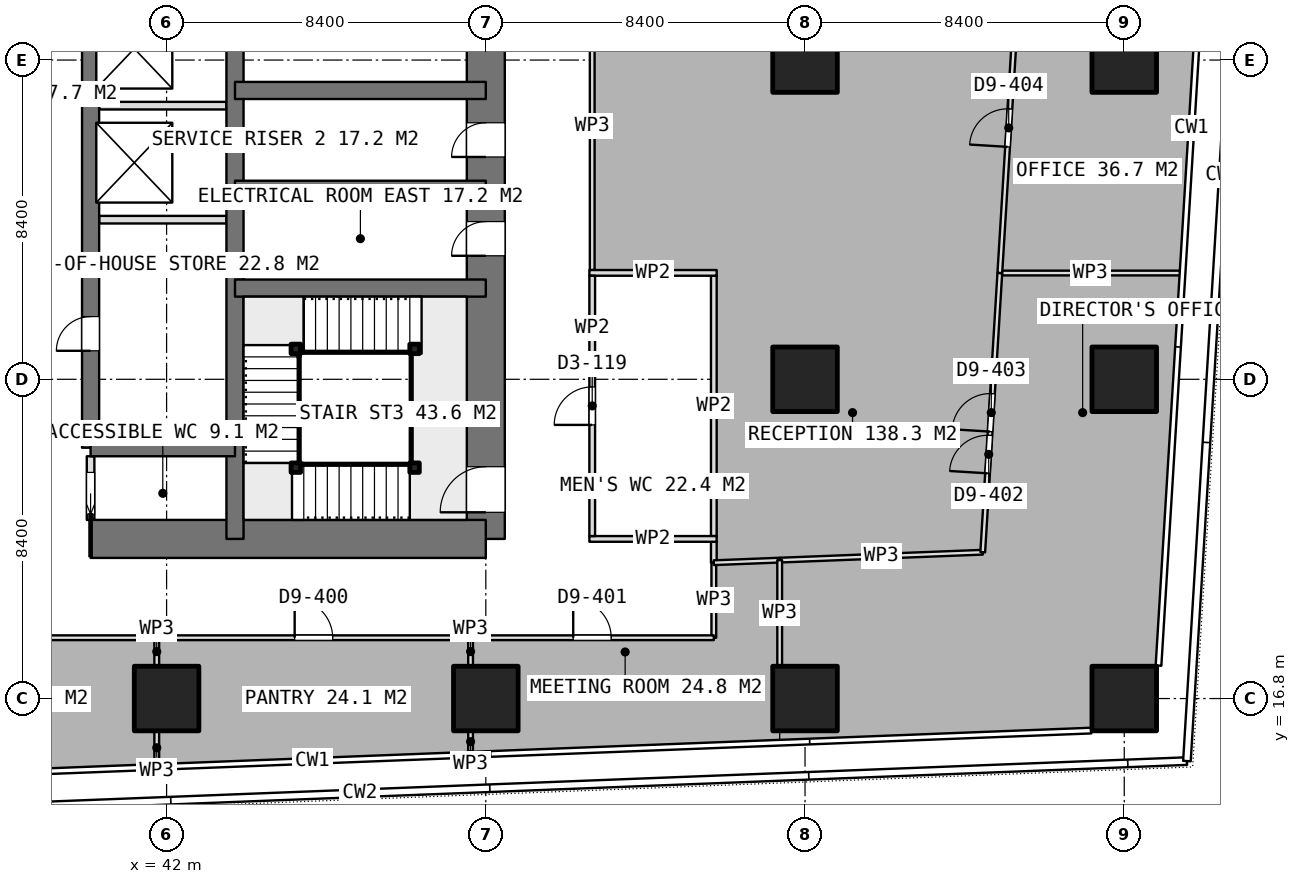
"""IFC4 building model, lengths in metres.
Left out: names, types, materials, properties, quantities, classifications, styles, units other than length and angle.
Written with IfcOpenShell. Run it as: python <this file> out.ifc"""

import sys

from ifc_helpers import new_model, si_unit, direction, frame, frame_2d, origin, origin_2d, place, context, subcontext, project, spatial, rectangle, extrude, element, fill, save


model = new_model("IFC4")
c1 = context("Model", 3, precision=1e-05, world=origin(), true_north=direction((0.0, 1.0)))
c2 = subcontext(c1, "Body", "Model", "MODEL_VIEW")
j1 = project(units=[si_unit("LENGTHUNIT", "METRE"), si_unit("PLANEANGLEUNIT", "RADIAN")], contexts=[c1])
p1 = place(None, origin())
s1 = spatial("IfcSite", under=j1, at=p1, CompositionType="ELEMENT")
p2 = place(p1, origin())
s2 = spatial("IfcBuilding", under=s1, at=p2, CompositionType="ELEMENT")
p3 = place(p2, frame((0.0, 0.0, 114.05)))
s3 = spatial("IfcBuildingStorey", under=s2, at=p3, CompositionType="ELEMENT", Elevation=114.05)
p4 = place(p3, frame((40.0, 21.0, 0.0), z_axis=(0.0, 0.0, 1.0), x_axis=(1.0, 0.0, 0.0)))
e1 = element("IfcWall", 1, at=p4, inside=s3, PredefinedType="SHEAR", context=c2, shape_type="SweptSolid", body=[
    extrude(rectangle(XDim=10.4, YDim=1.0, at=frame_2d((5.2, 0.0))), origin(), (0.0, 0.0, 1.0), 3.75),
])
p5 = place(p3, frame((50.4, 21.0, 0.0), z_axis=(0.0, 0.0, 1.0), x_axis=(0.0, 1.0, 0.0)))
e2 = element("IfcWall", 2, at=p5, inside=s3, PredefinedType="SHEAR", context=c2, shape_type="SweptSolid", body=[
    extrude(rectangle(XDim=25.2, YDim=1.0, at=frame_2d((12.6, 0.0))), origin(), (0.0, 0.0, 1.0), 3.75),
])
p6 = place(p5, frame((16.2, 0.0, 0.0)))
e3 = element("IfcOpeningElement", 3, at=p6, cuts=e2, PredefinedType="OPENING", context=c2, shape_type="SweptSolid", body=[
    extrude(rectangle(XDim=1.2, YDim=2.1, at=frame_2d((0.6, 1.05))), frame((0.0, 0.51, 0.0), z_axis=(0.0, -1.0, 0.0), x_axis=(1.0, 0.0, 0.0)), (0.0, 0.0, 1.0), 1.02),
])
p7 = place(p5, frame((10.05, 0.0, 0.0)))
e4 = element("IfcOpeningElement", 4, at=p7, cuts=e2, PredefinedType="OPENING", context=c2, shape_type="SweptSolid", body=[
    extrude(rectangle(XDim=0.9, YDim=2.1, at=frame_2d((0.45, 1.05))), frame((0.0, 0.51, 0.0), z_axis=(0.0, -1.0, 0.0), x_axis=(1.0, 0.0, 0.0)), (0.0, 0.0, 1.0), 1.02),
])
p8 = place(p5, frame((7.45, 0.0, 0.0)))
e5 = element("IfcOpeningElement", 5, at=p8, cuts=e2, PredefinedType="OPENING", context=c2, shape_type="SweptSolid", body=[
    extrude(rectangle(XDim=0.9, YDim=2.1, at=frame_2d((0.45, 1.05))), frame((0.0, 0.51, 0.0), z_axis=(0.0, -1.0, 0.0), x_axis=(1.0, 0.0, 0.0)), (0.0, 0.0, 1.0), 1.02),
])
p9 = place(p5, frame((0.7, 0.0, 0.0)))
e6 = element("IfcOpeningElement", 6, at=p9, cuts=e2, PredefinedType="OPENING", context=c2, shape_type="SweptSolid", body=[
    extrude(rectangle(XDim=1.2, YDim=2.1, at=frame_2d((0.6, 1.05))), frame((0.0, 0.51, 0.0), z_axis=(0.0, -1.0, 0.0), x_axis=(1.0, 0.0, 0.0)), (0.0, 0.0, 1.0), 1.02),
])
p10 = place(p3, frame((43.8, 21.0, 0.0), z_axis=(0.0, 0.0, 1.0), x_axis=(0.0, 1.0, 0.0)))
e7 = element("IfcWall", 7, at=p10, inside=s3, PredefinedType="SHEAR", context=c2, shape_type="SweptSolid", body=[
    extrude(rectangle(XDim=25.2, YDim=0.45, at=frame_2d((12.6, 0.0))), origin(), (0.0, 0.0, 1.0), 3.75),
])
p11 = place(p3, frame((40.0, 23.4, 0.0), z_axis=(0.0, 0.0, 1.0), x_axis=(0.0, 1.0, 0.0)))
e8 = element("IfcWall", 8, at=p11, inside=s3, PredefinedType="SHEAR", context=c2, shape_type="SweptSolid", body=[
    extrude(rectangle(XDim=18.0, YDim=0.45, at=frame_2d((9.0, 0.0))), origin(), (0.0, 0.0, 1.0), 3.75),
])
p12 = place(p11, frame((2.55, 0.0, 0.0)))
e9 = element("IfcOpeningElement", 9, at=p12, cuts=e8, PredefinedType="OPENING", context=c2, shape_type="SweptSolid", body=[
    extrude(rectangle(XDim=0.9, YDim=2.1, at=frame_2d((0.45, 1.05))), frame((0.0, 0.235, 0.0), z_axis=(0.0, -1.0, 0.0), x_axis=(1.0, 0.0, 0.0)), (0.0, 0.0, 1.0), 0.47),
])
p13 = place(p3, frame((40.0, 23.4, 0.0), z_axis=(0.0, 0.0, 1.0), x_axis=(1.0, 0.0, 0.0)))
e10 = element("IfcWall", 10, at=p13, inside=s3, PredefinedType="SHEAR", context=c2, shape_type="SweptSolid", body=[
    extrude(rectangle(XDim=3.8, YDim=0.45, at=frame_2d((1.9, 0.0))), origin(), (0.0, 0.0, 1.0), 3.75),
])
for number, where, z_axis, x_axis in (
    (11, (43.8, 27.6, 0.0), (0.0, 0.0, 1.0), (1.0, 0.0, 0.0)),
    (12, (43.8, 30.2, 0.0), (0.0, 0.0, 1.0), (1.0, 0.0, 0.0)),
    (13, (43.8, 32.8, 0.0), (0.0, 0.0, 1.0), (1.0, 0.0, 0.0)),
):
    element("IfcWall", number, at=place(p3, frame(where, z_axis=z_axis, x_axis=x_axis)), inside=s3, PredefinedType="SHEAR", context=c2, shape_type="SweptSolid", body=[
        extrude(rectangle(XDim=6.6, YDim=0.45, at=frame_2d((3.3, 0.0))), origin(), (0.0, 0.0, 1.0), 3.75),
    ])
for number, where, z_axis, x_axis in (
    (14, (42.0, 16.8, 0.0), (0.0, 0.0, 1.0), (1.0, 0.0, 0.0)),
    (15, (50.4, 16.8, 0.0), (0.0, 0.0, 1.0), (1.0, 0.0, 0.0)),
    (16, (58.8, 16.8, 0.0), (0.0, 0.0, 1.0), (1.0, 0.0, 0.0)),
    (17, (58.8, 25.2, 0.0), (0.0, 0.0, 1.0), (1.0, 0.0, 0.0)),
    (18, (58.8, 33.6, 0.0), (0.0, 0.0, 1.0), (1.0, 0.0, 0.0)),
    (19, (67.2, 16.8, 0.0), (0.0, 0.0, 1.0), (1.0, 0.0, 0.0)),
    (20, (67.2, 25.2, 0.0), (0.0, 0.0, 1.0), (1.0, 0.0, 0.0)),
    (21, (67.2, 33.6, 0.0), (0.0, 0.0, 1.0), (1.0, 0.0, 0.0)),
):
    element("IfcColumn", number, at=place(p3, frame(where, z_axis=z_axis, x_axis=x_axis)), inside=s3, PredefinedType="COLUMN", context=c2, shape_type="SweptSolid", body=[
        extrude(rectangle(XDim=1.7, YDim=1.7, at=origin_2d()), origin(), (0.0, 0.0, 1.0), 3.75),
    ])
for number, where, z_axis, x_axis in (
    (22, (40.225, 29.4, 0.0), (0.0, 0.0, 1.0), (1.0, 0.0, 0.0)),
    (23, (40.225, 32.4, 0.0), (0.0, 0.0, 1.0), (1.0, 0.0, 0.0)),
):
    element("IfcWall", number, at=place(p3, frame(where, z_axis=z_axis, x_axis=x_axis)), inside=s3, PredefinedType="PARTITIONING", context=c2, shape_type="SweptSolid", body=[
        extrude(rectangle(XDim=3.35, YDim=0.2, at=frame_2d((1.675, 0.0))), origin(), (0.0, 0.0, 1.0), 3.5),
    ])
p14 = place(p3, frame((40.0, 21.5, 0.0), z_axis=(0.0, 0.0, 1.0), x_axis=(0.0, 1.0, 0.0)))
e24 = element("IfcWall", 24, at=p14, inside=s3, PredefinedType="PARTITIONING", context=c2, shape_type="SweptSolid", body=[
    extrude(rectangle(XDim=1.675, YDim=0.2, at=frame_2d((0.837, 0.0))), origin(), (0.0, 0.0, 1.0), 3.5),
])
p15 = place(p14, frame((0.15, 0.0, 0.0)))
e25 = element("IfcOpeningElement", 25, at=p15, cuts=e24, PredefinedType="OPENING", context=c2, shape_type="SweptSolid", body=[
    extrude(rectangle(XDim=1.1, YDim=2.1, at=frame_2d((0.55, 1.05))), frame((0.0, 0.11, 0.0), z_axis=(0.0, -1.0, 0.0), x_axis=(1.0, 0.0, 0.0)), (0.0, 0.0, 1.0), 0.22),
])
for number, where, z_axis, x_axis in (
    (26, (53.125, 21.0, 0.0), (0.0, 0.0, 1.0), (1.0, 0.0, 0.0)),
    (27, (53.125, 28.0, 0.0), (0.0, 0.0, 1.0), (1.0, 0.0, 0.0)),
):
    element("IfcWall", number, at=place(p3, frame(where, z_axis=z_axis, x_axis=x_axis)), inside=s3, PredefinedType="PARTITIONING", context=c2, shape_type="SweptSolid", body=[
        extrude(rectangle(XDim=3.35, YDim=0.15, at=frame_2d((1.675, 0.0))), origin(), (0.0, 0.0, 1.0), 3.5),
    ])
p16 = place(p3, frame((53.2, 21.075, 0.0), z_axis=(0.0, 0.0, 1.0), x_axis=(0.0, 1.0, 0.0)))
e28 = element("IfcWall", 28, at=p16, inside=s3, PredefinedType="PARTITIONING", context=c2, shape_type="SweptSolid", body=[
    extrude(rectangle(XDim=6.85, YDim=0.15, at=frame_2d((3.425, 0.0))), origin(), (0.0, 0.0, 1.0), 3.5),
])
p17 = place(p16, frame((2.925, 0.0, 0.0)))
e29 = element("IfcOpeningElement", 29, at=p17, cuts=e28, PredefinedType="OPENING", context=c2, shape_type="SweptSolid", body=[
    extrude(rectangle(XDim=1.0, YDim=2.1, at=frame_2d((0.5, 1.05))), frame((0.0, 0.085, 0.0), z_axis=(0.0, -1.0, 0.0), x_axis=(1.0, 0.0, 0.0)), (0.0, 0.0, 1.0), 0.17),
])
p18 = place(p3, frame((56.4, 21.075, 0.0), z_axis=(0.0, 0.0, 1.0), x_axis=(0.0, 1.0, 0.0)))
e30 = element("IfcWall", 30, at=p18, inside=s3, PredefinedType="PARTITIONING", context=c2, shape_type="SweptSolid", body=[
    extrude(rectangle(XDim=6.85, YDim=0.15, at=frame_2d((3.425, 0.0))), origin(), (0.0, 0.0, 1.0), 3.5),
])
p19 = place(p3, frame((41.741, 15.08, 0.0), z_axis=(0.0, 0.0, 1.0), x_axis=(0.0, 1.0, 0.0)))
e31 = element("IfcWall", 31, at=p19, inside=s3, PredefinedType="PARTITIONING", context=c2, shape_type="SweptSolid", body=[
    extrude(rectangle(XDim=0.85, YDim=0.125, at=frame_2d((0.425, 0.0))), origin(), (0.0, 0.0, 1.0), 3.5),
])
p20 = place(p3, frame((41.741, 17.67, 0.0), z_axis=(0.0, 0.0, 1.0), x_axis=(0.0, 1.0, 0.0)))
e32 = element("IfcWall", 32, at=p20, inside=s3, PredefinedType="PARTITIONING", context=c2, shape_type="SweptSolid", body=[
    extrude(rectangle(XDim=0.73, YDim=0.125, at=frame_2d((0.365, 0.0))), origin(), (0.0, 0.0, 1.0), 3.5),
])
p21 = place(p3, frame((41.741, 18.4, 0.0), z_axis=(0.0, 0.0, 1.0), x_axis=(1.0, 0.0, 0.0)))
e33 = element("IfcWall", 33, at=p21, inside=s3, PredefinedType="PARTITIONING", context=c2, shape_type="SweptSolid", body=[
    extrude(rectangle(XDim=8.258, YDim=0.125, at=frame_2d((4.129, 0.0))), origin(), (0.0, 0.0, 1.0), 3.5),
])
p22 = place(p21, frame((3.629, 0.0, 0.0)))
e34 = element("IfcOpeningElement", 34, at=p22, cuts=e33, PredefinedType="OPENING", context=c2, shape_type="SweptSolid", body=[
    extrude(rectangle(XDim=1.0, YDim=2.1, at=frame_2d((0.5, 1.05))), frame((0.0, 0.073, 0.0), z_axis=(0.0, -1.0, 0.0), x_axis=(1.0, 0.0, 0.0)), (0.0, 0.0, 1.0), 0.145),
])
p23 = place(p3, frame((49.999, 18.4, 0.0), z_axis=(0.0, 0.0, 1.0), x_axis=(0.0, -1.0, 0.0)))
e35 = element("IfcWall", 35, at=p23, inside=s3, PredefinedType="PARTITIONING", context=c2, shape_type="SweptSolid", body=[
    extrude(rectangle(XDim=0.73, YDim=0.125, at=frame_2d((0.365, 0.0))), origin(), (0.0, 0.0, 1.0), 3.5),
])
p24 = place(p3, frame((49.999, 15.93, 0.0), z_axis=(0.0, 0.0, 1.0), x_axis=(0.0, -1.0, 0.0)))
e36 = element("IfcWall", 36, at=p24, inside=s3, PredefinedType="PARTITIONING", context=c2, shape_type="SweptSolid", body=[
    extrude(rectangle(XDim=0.529, YDim=0.125, at=frame_2d((0.265, 0.0))), origin(), (0.0, 0.0, 1.0), 3.5),
])
p25 = place(p3, frame((56.4, 20.374, 0.0), z_axis=(0.0, 0.0, 1.0), x_axis=(0.999234110548, 0.039130452561, 0.0)))
e37 = element("IfcWall", 37, at=p25, inside=s3, PredefinedType="PARTITIONING", context=c2, shape_type="SweptSolid", body=[
    extrude(rectangle(XDim=1.734, YDim=0.125, at=frame_2d((0.867, 0.0))), origin(), (0.0, 0.0, 1.0), 3.5),
])
p26 = place(p3, frame((58.133, 20.442, 0.0), z_axis=(0.0, 0.0, 1.0), x_axis=(0.0, -1.0, 0.0)))
e38 = element("IfcWall", 38, at=p26, inside=s3, PredefinedType="PARTITIONING", context=c2, shape_type="SweptSolid", body=[
    extrude(rectangle(XDim=2.772, YDim=0.125, at=frame_2d((1.386, 0.0))), origin(), (0.0, 0.0, 1.0), 3.5),
])
p27 = place(p3, frame((50.0, 18.4, 0.0), z_axis=(0.0, 0.0, 1.0), x_axis=(1.0, 0.0, 0.0)))
e39 = element("IfcWall", 39, at=p27, inside=s3, PredefinedType="PARTITIONING", context=c2, shape_type="SweptSolid", body=[
    extrude(rectangle(XDim=6.4, YDim=0.125, at=frame_2d((3.2, 0.0))), origin(), (0.0, 0.0, 1.0), 3.5),
])
p28 = place(p27, frame((2.7, 0.0, 0.0)))
e40 = element("IfcOpeningElement", 40, at=p28, cuts=e39, PredefinedType="OPENING", context=c2, shape_type="SweptSolid", body=[
    extrude(rectangle(XDim=1.0, YDim=2.1, at=frame_2d((0.5, 1.05))), frame((0.0, 0.073, 0.0), z_axis=(0.0, -1.0, 0.0), x_axis=(1.0, 0.0, 0.0)), (0.0, 0.0, 1.0), 0.145),
])
p29 = place(p3, frame((56.4, 18.4, 0.0), z_axis=(0.0, 0.0, 1.0), x_axis=(0.0, 1.0, 0.0)))
e41 = element("IfcWall", 41, at=p29, inside=s3, PredefinedType="PARTITIONING", context=c2, shape_type="SweptSolid", body=[
    extrude(rectangle(XDim=1.974, YDim=0.125, at=frame_2d((0.987, 0.0))), origin(), (0.0, 0.0, 1.0), 3.5),
])
p30 = place(p3, frame((63.926, 27.996, 0.0), z_axis=(0.0, 0.0, 1.0), x_axis=(1.0, 0.0, 0.0)))
e42 = element("IfcWall", 42, at=p30, inside=s3, PredefinedType="PARTITIONING", context=c2, shape_type="SweptSolid", body=[
    extrude(rectangle(XDim=4.758, YDim=0.125, at=frame_2d((2.379, 0.0))), origin(), (0.0, 0.0, 1.0), 3.5),
])
p31 = place(p3, frame((58.134, 20.442, 0.0), z_axis=(0.0, 0.0, 1.0), x_axis=(0.999242781249, 0.03890840682, 0.0)))
e43 = element("IfcWall", 43, at=p31, inside=s3, PredefinedType="PARTITIONING", context=c2, shape_type="SweptSolid", body=[
    extrude(rectangle(XDim=5.346, YDim=0.125, at=frame_2d((2.673, 0.0))), origin(), (0.0, 0.0, 1.0), 3.5),
])
p32 = place(p3, frame((63.476, 20.65, 0.0), z_axis=(0.0, 0.0, 1.0), x_axis=(0.061135017565, 0.998129505439, 0.0)))
e44 = element("IfcWall", 44, at=p32, inside=s3, PredefinedType="PARTITIONING", context=c2, shape_type="SweptSolid", body=[
    extrude(rectangle(XDim=7.36, YDim=0.125, at=frame_2d((3.68, 0.0))), origin(), (0.0, 0.0, 1.0), 3.5),
])
p33 = place(p32, frame((3.18, 0.0, 0.0)))
e45 = element("IfcOpeningElement", 45, at=p33, cuts=e44, PredefinedType="OPENING", context=c2, shape_type="SweptSolid", body=[
    extrude(rectangle(XDim=1.0, YDim=2.1, at=frame_2d((0.5, 1.05))), frame((0.0, 0.073, 0.0), z_axis=(0.0, -1.0, 0.0), x_axis=(1.0, 0.0, 0.0)), (0.0, 0.0, 1.0), 0.145),
])
p34 = place(p32, frame((2.08, 0.0, 0.0)))
e46 = element("IfcOpeningElement", 46, at=p34, cuts=e44, PredefinedType="OPENING", context=c2, shape_type="SweptSolid", body=[
    extrude(rectangle(XDim=1.0, YDim=2.1, at=frame_2d((0.5, 1.05))), frame((0.0, 0.073, 0.0), z_axis=(0.0, -1.0, 0.0), x_axis=(1.0, 0.0, 0.0)), (0.0, 0.0, 1.0), 0.145),
])
p35 = place(p3, frame((63.926, 27.997, 0.0), z_axis=(0.0, 0.0, 1.0), x_axis=(0.061176245149, 0.998126979412, 0.0)))
e47 = element("IfcWall", 47, at=p35, inside=s3, PredefinedType="PARTITIONING", context=c2, shape_type="SweptSolid", body=[
    extrude(rectangle(XDim=7.65, YDim=0.125, at=frame_2d((3.825, 0.0))), origin(), (0.0, 0.0, 1.0), 3.5),
])
p36 = place(p35, frame((3.325, 0.0, 0.0)))
e48 = element("IfcOpeningElement", 48, at=p36, cuts=e47, PredefinedType="OPENING", context=c2, shape_type="SweptSolid", body=[
    extrude(rectangle(XDim=1.0, YDim=2.1, at=frame_2d((0.5, 1.05))), frame((0.0, 0.073, 0.0), z_axis=(0.0, -1.0, 0.0), x_axis=(1.0, 0.0, 0.0)), (0.0, 0.0, 1.0), 0.145),
])
p37 = place(p3, frame((53.2, 28.075, 0.0), z_axis=(0.0, 0.0, 1.0), x_axis=(0.0, 1.0, 0.0)))
e49 = element("IfcWall", 49, at=p37, inside=s3, PredefinedType="PARTITIONING", context=c2, shape_type="SweptSolid", body=[
    extrude(rectangle(XDim=7.558, YDim=0.125, at=frame_2d((3.779, 0.0))), origin(), (0.0, 0.0, 1.0), 3.5),
])
p38 = place(p3, frame((56.4, 20.374, 0.0), z_axis=(0.0, 0.0, 1.0), x_axis=(0.0, 1.0, 0.0)))
e50 = element("IfcWall", 50, at=p38, inside=s3, PredefinedType="PARTITIONING", context=c2, shape_type="SweptSolid", body=[
    extrude(rectangle(XDim=0.551, YDim=0.15, at=frame_2d((0.275, 0.0))), origin(), (0.0, 0.0, 1.0), 3.5),
])
p39 = place(p3, frame((33.826, 18.4, 0.0), z_axis=(0.0, 0.0, 1.0), x_axis=(1.0, 0.0, 0.0)))
e51 = element("IfcWall", 51, at=p39, inside=s3, PredefinedType="PARTITIONING", context=c2, shape_type="SweptSolid", body=[
    extrude(rectangle(XDim=7.914, YDim=0.125, at=frame_2d((3.957, 0.0))), origin(), (0.0, 0.0, 1.0), 3.5),
])
p40 = place(p39, frame((3.457, 0.0, 0.0)))
e52 = element("IfcOpeningElement", 52, at=p40, cuts=e51, PredefinedType="OPENING", context=c2, shape_type="SweptSolid", body=[
    extrude(rectangle(XDim=1.0, YDim=2.1, at=frame_2d((0.5, 1.05))), frame((0.0, 0.073, 0.0), z_axis=(0.0, -1.0, 0.0), x_axis=(1.0, 0.0, 0.0)), (0.0, 0.0, 1.0), 0.145),
])
for number, where, z_axis, x_axis in (
    (53, (48.525, 22.875, 0.0), (0.0, 0.0, 1.0), (1.0, 0.0, 0.0)),
    (54, (45.4, 22.875, 0.0), (0.0, 0.0, 1.0), (1.0, 0.0, 0.0)),
    (55, (45.4, 26.0, 0.0), (0.0, 0.0, 1.0), (1.0, 0.0, 0.0)),
    (56, (48.525, 26.0, 0.0), (0.0, 0.0, 1.0), (1.0, 0.0, 0.0)),
):
    element("IfcColumn", number, at=place(p3, frame(where, z_axis=z_axis, x_axis=x_axis)), inside=s3, PredefinedType="COLUMN", context=c2, shape_type="SweptSolid", body=[
        extrude(rectangle(XDim=0.25, YDim=0.25, at=origin_2d()), origin(), (0.0, 0.0, 1.0), 3.75),
    ])
p41 = place(p7, origin())
e57 = element("IfcDoor", 57, at=p41, inside=s3, OperationType="SINGLE_SWING_LEFT", PredefinedType="DOOR", context=c2, shape_type="SweptSolid", body=[
    extrude(rectangle(XDim=0.9, YDim=2.1, at=frame_2d((0.45, 1.05))), frame((0.0, 0.025, 0.0), z_axis=(0.0, -1.0, 0.0), x_axis=(1.0, 0.0, 0.0)), (0.0, 0.0, 1.0), 0.05),
])
fill(e4, e57)
p42 = place(p8, origin())
e58 = element("IfcDoor", 58, at=p42, inside=s3, OperationType="SINGLE_SWING_LEFT", PredefinedType="DOOR", context=c2, shape_type="SweptSolid", body=[
    extrude(rectangle(XDim=0.9, YDim=2.1, at=frame_2d((0.45, 1.05))), frame((0.0, 0.025, 0.0), z_axis=(0.0, -1.0, 0.0), x_axis=(1.0, 0.0, 0.0)), (0.0, 0.0, 1.0), 0.05),
])
fill(e5, e58)
p43 = place(p15, origin())
e59 = element("IfcDoor", 59, at=p43, inside=s3, OperationType="SLIDING_TO_LEFT", PredefinedType="DOOR", context=c2, shape_type="SweptSolid", body=[
    extrude(rectangle(XDim=1.1, YDim=2.1, at=frame_2d((0.55, 1.05))), frame((0.0, 0.025, 0.0), z_axis=(0.0, -1.0, 0.0), x_axis=(1.0, 0.0, 0.0)), (0.0, 0.0, 1.0), 0.05),
])
fill(e25, e59)
p44 = place(p12, origin())
e60 = element("IfcDoor", 60, at=p44, inside=s3, OperationType="SINGLE_SWING_LEFT", PredefinedType="DOOR", context=c2, shape_type="SweptSolid", body=[
    extrude(rectangle(XDim=0.9, YDim=2.1, at=frame_2d((0.45, 1.05))), frame((0.0, 0.025, 0.0), z_axis=(0.0, -1.0, 0.0), x_axis=(1.0, 0.0, 0.0)), (0.0, 0.0, 1.0), 0.05),
])
fill(e9, e60)
p45 = place(p17, origin())
e61 = element("IfcDoor", 61, at=p45, inside=s3, OperationType="SINGLE_SWING_LEFT", PredefinedType="DOOR", context=c2, shape_type="SweptSolid", body=[
    extrude(rectangle(XDim=1.0, YDim=2.1, at=frame_2d((0.5, 1.05))), frame((0.0, 0.025, 0.0), z_axis=(0.0, -1.0, 0.0), x_axis=(1.0, 0.0, 0.0)), (0.0, 0.0, 1.0), 0.05),
])
fill(e29, e61)
p46 = place(p22, origin())
e62 = element("IfcDoor", 62, at=p46, inside=s3, OperationType="SINGLE_SWING_LEFT", PredefinedType="DOOR", context=c2, shape_type="SweptSolid", body=[
    extrude(rectangle(XDim=1.0, YDim=2.1, at=frame_2d((0.5, 1.05))), frame((0.0, 0.025, 0.0), z_axis=(0.0, -1.0, 0.0), x_axis=(1.0, 0.0, 0.0)), (0.0, 0.0, 1.0), 0.05),
])
fill(e34, e62)
p47 = place(p28, origin())
e63 = element("IfcDoor", 63, at=p47, inside=s3, OperationType="SINGLE_SWING_LEFT", PredefinedType="DOOR", context=c2, shape_type="SweptSolid", body=[
    extrude(rectangle(XDim=1.0, YDim=2.1, at=frame_2d((0.5, 1.05))), frame((0.0, 0.025, 0.0), z_axis=(0.0, -1.0, 0.0), x_axis=(1.0, 0.0, 0.0)), (0.0, 0.0, 1.0), 0.05),
])
fill(e40, e63)
p48 = place(p33, origin())
e64 = element("IfcDoor", 64, at=p48, inside=s3, OperationType="SINGLE_SWING_LEFT", PredefinedType="DOOR", context=c2, shape_type="SweptSolid", body=[
    extrude(rectangle(XDim=1.0, YDim=2.1, at=frame_2d((0.5, 1.05))), frame((0.0, 0.025, 0.0), z_axis=(0.0, -1.0, 0.0), x_axis=(1.0, 0.0, 0.0)), (0.0, 0.0, 1.0), 0.05),
])
fill(e45, e64)
p49 = place(p36, origin())
e65 = element("IfcDoor", 65, at=p49, inside=s3, OperationType="SINGLE_SWING_LEFT", PredefinedType="DOOR", context=c2, shape_type="SweptSolid", body=[
    extrude(rectangle(XDim=1.0, YDim=2.1, at=frame_2d((0.5, 1.05))), frame((0.0, 0.025, 0.0), z_axis=(0.0, -1.0, 0.0), x_axis=(1.0, 0.0, 0.0)), (0.0, 0.0, 1.0), 0.05),
])
fill(e48, e65)
p50 = place(p34, origin())
e66 = element("IfcDoor", 66, at=p50, inside=s3, OperationType="SINGLE_SWING_LEFT", PredefinedType="DOOR", context=c2, shape_type="SweptSolid", body=[
    extrude(rectangle(XDim=1.0, YDim=2.1, at=frame_2d((0.5, 1.05))), frame((0.0, 0.025, 0.0), z_axis=(0.0, -1.0, 0.0), x_axis=(1.0, 0.0, 0.0)), (0.0, 0.0, 1.0), 0.05),
])
fill(e46, e66)
p51 = place(p9, origin())
e67 = element("IfcDoor", 67, at=p51, inside=s3, OperationType="SINGLE_SWING_RIGHT", PredefinedType="DOOR", context=c2, shape_type="SweptSolid", body=[
    extrude(rectangle(XDim=1.2, YDim=2.1, at=frame_2d((0.6, 1.05))), frame((0.0, 0.025, 0.0), z_axis=(0.0, -1.0, 0.0), x_axis=(1.0, 0.0, 0.0)), (0.0, 0.0, 1.0), 0.05),
])
fill(e6, e67)
save(model, sys.argv[1])
